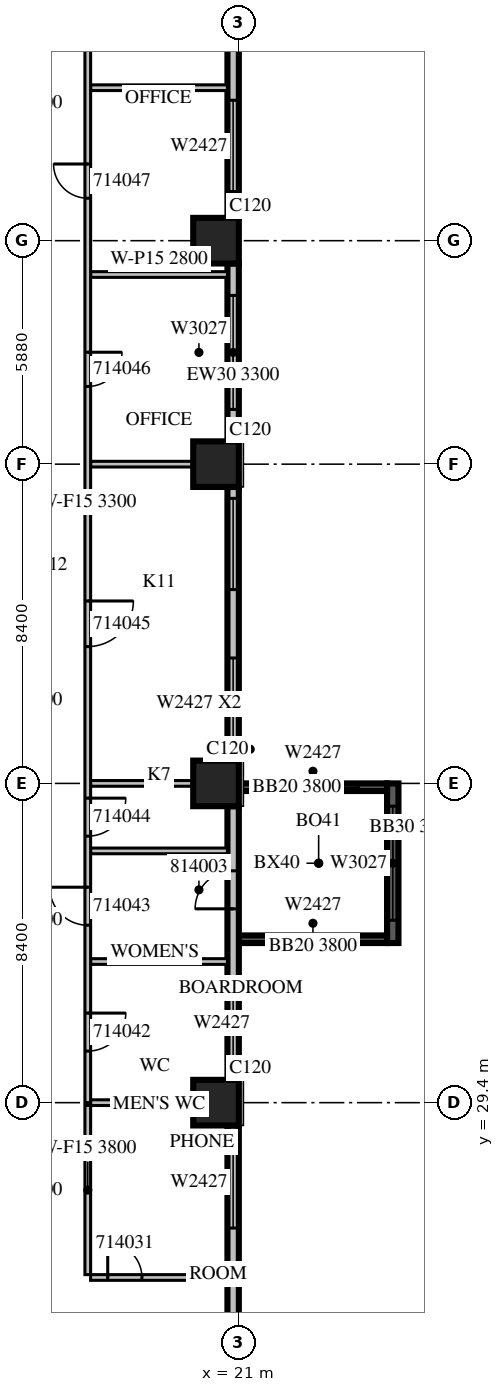
"""IFC4 building model, lengths in metres.
Left out: names, types, materials, properties, quantities, classifications, styles, units other than length and angle.
Written with IfcOpenShell. Run it as: python <this file> out.ifc"""

import sys

from ifc_helpers import new_model, si_unit, direction, frame, frame_2d, origin, origin_2d, place, context, subcontext, project, spatial, rectangle, extrude, source, transform, mapped, element, fill, save


model = new_model("IFC4")
c1 = context("Model", 3, precision=1e-05, world=origin(), true_north=direction((0.0, 1.0)))
c2 = subcontext(c1, "Body", "Model", "MODEL_VIEW")
j1 = project(units=[si_unit("LENGTHUNIT", "METRE"), si_unit("PLANEANGLEUNIT", "RADIAN")], contexts=[c1])
p1 = place(None, origin())
s1 = spatial("IfcSite", under=j1, at=p1, CompositionType="ELEMENT")
p2 = place(p1, origin())
s2 = spatial("IfcBuilding", under=s1, at=p2, CompositionType="ELEMENT")
p3 = place(p2, frame((0.0, 0.0, 69.9)))
s3 = spatial("IfcBuildingStorey", under=s2, at=p3, CompositionType="ELEMENT", Elevation=69.9)
m1 = source(origin(), c2, "Body", "SweptSolid", [
    extrude(rectangle(XDim=1.2, YDim=1.2, at=origin_2d()), origin(), (0.0, 0.0, 1.0), 4.2),
])
for number, where, z_axis, x_axis in (
    (1, (20.4, 29.4, 0.0), (0.0, 0.0, 1.0), (1.0, 0.0, 0.0)),
    (2, (20.4, 37.8, 0.0), (0.0, 0.0, 1.0), (1.0, 0.0, 0.0)),
    (3, (20.4, 46.2, 0.0), (0.0, 0.0, 1.0), (1.0, 0.0, 0.0)),
    (4, (20.4, 52.08, 0.0), (0.0, 0.0, 1.0), (1.0, 0.0, 0.0)),
):
    element("IfcColumn", number, at=place(p3, frame(where, z_axis=z_axis, x_axis=x_axis)), inside=s3, PredefinedType="COLUMN", context=c2, shape_type="MappedRepresentation", body=[
        mapped(m1, transform((0.0, 0.0, 0.0), scale=1.0)),
    ])
m2 = source(origin(), c2, "Body", "SweptSolid", [
    extrude(rectangle(XDim=4.2, YDim=0.3, at=frame_2d((2.1, 0.0))), origin(), (0.0, 0.0, 1.0), 3.8),
])
p4 = place(p3, frame((25.05, 33.6, 0.0), z_axis=(0.0, 0.0, 1.0), x_axis=(0.0, 1.0, 0.0)))
e5 = element("IfcWall", 5, at=p4, inside=s3, PredefinedType="SOLIDWALL", context=c2, shape_type="MappedRepresentation", body=[
    mapped(m2, transform((0.0, 0.0, 0.0), scale=1.0)),
])
m3 = source(origin(), c2, "Body", "SweptSolid", [
    extrude(rectangle(XDim=3.0, YDim=2.7, at=frame_2d((1.5, 1.35))), frame((0.0, 0.16, 0.0), z_axis=(0.0, -1.0, 0.0), x_axis=(1.0, 0.0, 0.0)), (0.0, 0.0, 1.0), 0.32),
])
p5 = place(p4, frame((0.6, 0.0, 0.6)))
e6 = element("IfcOpeningElement", 6, at=p5, cuts=e5, PredefinedType="OPENING", context=c2, shape_type="MappedRepresentation", body=[
    mapped(m3, transform((0.0, 0.0, 0.0), scale=1.0)),
])
m4 = source(origin(), c2, "Body", "SweptSolid", [
    extrude(rectangle(XDim=3.9, YDim=0.2, at=frame_2d((1.95, 0.0))), origin(), (0.0, 0.0, 1.0), 3.8),
])
p6 = place(p3, frame((21.0, 33.7, 0.0), z_axis=(0.0, 0.0, 1.0), x_axis=(1.0, 0.0, 0.0)))
e7 = element("IfcWall", 7, at=p6, inside=s3, PredefinedType="SOLIDWALL", context=c2, shape_type="MappedRepresentation", body=[
    mapped(m4, transform((0.0, 0.0, 0.0), scale=1.0)),
])
m5 = source(origin(), c2, "Body", "SweptSolid", [
    extrude(rectangle(XDim=2.4, YDim=2.7, at=frame_2d((1.2, 1.35))), frame((0.0, 0.11, 0.0), z_axis=(0.0, -1.0, 0.0), x_axis=(1.0, 0.0, 0.0)), (0.0, 0.0, 1.0), 0.22),
])
p7 = place(p6, frame((0.75, 0.0, 0.6)))
e8 = element("IfcOpeningElement", 8, at=p7, cuts=e7, PredefinedType="OPENING", context=c2, shape_type="MappedRepresentation", body=[
    mapped(m5, transform((0.0, 0.0, 0.0), scale=1.0)),
])
p8 = place(p3, frame((21.0, 37.7, 0.0), z_axis=(0.0, 0.0, 1.0), x_axis=(1.0, 0.0, 0.0)))
e9 = element("IfcWall", 9, at=p8, inside=s3, PredefinedType="SOLIDWALL", context=c2, shape_type="MappedRepresentation", body=[
    mapped(m4, transform((0.0, 0.0, 0.0), scale=1.0)),
])
p9 = place(p8, frame((0.75, 0.0, 0.6)))
e10 = element("IfcOpeningElement", 10, at=p9, cuts=e9, PredefinedType="OPENING", context=c2, shape_type="MappedRepresentation", body=[
    mapped(m5, transform((0.0, 0.0, 0.0), scale=1.0)),
])
m6 = source(origin(), c2, "Body", "SweptSolid", [
    extrude(rectangle(XDim=6.6, YDim=0.3, at=frame_2d((3.3, 0.0))), origin(), (0.0, 0.0, 1.0), 3.8),
])
p10 = place(p3, frame((20.85, 22.2, 0.0), z_axis=(0.0, 0.0, 1.0), x_axis=(0.0, 1.0, 0.0)))
e11 = element("IfcWall", 11, at=p10, inside=s3, PredefinedType="STANDARD", context=c2, shape_type="MappedRepresentation", body=[
    mapped(m6, transform((0.0, 0.0, 0.0), scale=1.0)),
])
m7 = source(origin(), c2, "Body", "SweptSolid", [
    extrude(rectangle(XDim=1.2, YDim=2.7, at=frame_2d((0.6, 1.35))), frame((0.0, 0.16, 0.0), z_axis=(0.0, -1.0, 0.0), x_axis=(1.0, 0.0, 0.0)), (0.0, 0.0, 1.0), 0.32),
])
p11 = place(p10, frame((0.3, 0.0, 0.6)))
e12 = element("IfcOpeningElement", 12, at=p11, cuts=e11, PredefinedType="OPENING", context=c2, shape_type="MappedRepresentation", body=[
    mapped(m7, transform((0.0, 0.0, 0.0), scale=1.0)),
])
m8 = source(origin(), c2, "Body", "SweptSolid", [
    extrude(rectangle(XDim=2.4, YDim=2.7, at=frame_2d((1.2, 1.35))), frame((0.0, 0.16, 0.0), z_axis=(0.0, -1.0, 0.0), x_axis=(1.0, 0.0, 0.0)), (0.0, 0.0, 1.0), 0.32),
])
p12 = place(p10, frame((3.9, 0.0, 0.6)))
e13 = element("IfcOpeningElement", 13, at=p12, cuts=e11, PredefinedType="OPENING", context=c2, shape_type="MappedRepresentation", body=[
    mapped(m8, transform((0.0, 0.0, 0.0), scale=1.0)),
])
m9 = source(origin(), c2, "Body", "SweptSolid", [
    extrude(rectangle(XDim=7.2, YDim=0.3, at=frame_2d((3.6, 0.0))), origin(), (0.0, 0.0, 1.0), 3.8),
])
p13 = place(p3, frame((20.85, 30.0, 0.0), z_axis=(0.0, 0.0, 1.0), x_axis=(0.0, 1.0, 0.0)))
e14 = element("IfcWall", 14, at=p13, inside=s3, PredefinedType="STANDARD", context=c2, shape_type="MappedRepresentation", body=[
    mapped(m9, transform((0.0, 0.0, 0.0), scale=1.0)),
])
p14 = place(p13, frame((0.3, 0.0, 0.6)))
e15 = element("IfcOpeningElement", 15, at=p14, cuts=e14, PredefinedType="OPENING", context=c2, shape_type="MappedRepresentation", body=[
    mapped(m8, transform((0.0, 0.0, 0.0), scale=1.0)),
])
m10 = source(origin(), c2, "Body", "SweptSolid", [
    extrude(rectangle(XDim=1.0, YDim=2.1, at=frame_2d((0.5, 1.05))), frame((0.0, 0.16, 0.0), z_axis=(0.0, -1.0, 0.0), x_axis=(1.0, 0.0, 0.0)), (0.0, 0.0, 1.0), 0.32),
])
p15 = place(p13, frame((4.5, 0.0, 0.0)))
e16 = element("IfcOpeningElement", 16, at=p15, cuts=e14, PredefinedType="OPENING", context=c2, shape_type="MappedRepresentation", body=[
    mapped(m10, transform((0.0, 0.0, 0.0), scale=1.0)),
])
p16 = place(p3, frame((20.85, 38.4, 0.0), z_axis=(0.0, 0.0, 1.0), x_axis=(0.0, 1.0, 0.0)))
e17 = element("IfcWall", 17, at=p16, inside=s3, PredefinedType="STANDARD", context=c2, shape_type="MappedRepresentation", body=[
    mapped(m9, transform((0.0, 0.0, 0.0), scale=1.0)),
])
p17 = place(p16, frame((0.3, 0.0, 0.6)))
e18 = element("IfcOpeningElement", 18, at=p17, cuts=e17, PredefinedType="OPENING", context=c2, shape_type="MappedRepresentation", body=[
    mapped(m8, transform((0.0, 0.0, 0.0), scale=1.0)),
])
p18 = place(p16, frame((4.5, 0.0, 0.6)))
e19 = element("IfcOpeningElement", 19, at=p18, cuts=e17, PredefinedType="OPENING", context=c2, shape_type="MappedRepresentation", body=[
    mapped(m8, transform((0.0, 0.0, 0.0), scale=1.0)),
])
m11 = source(origin(), c2, "Body", "SweptSolid", [
    extrude(rectangle(XDim=4.68, YDim=0.3, at=frame_2d((2.34, 0.0))), origin(), (0.0, 0.0, 1.0), 3.3),
])
p19 = place(p3, frame((20.85, 46.8, 0.0), z_axis=(0.0, 0.0, 1.0), x_axis=(0.0, 1.0, 0.0)))
e20 = element("IfcWall", 20, at=p19, inside=s3, PredefinedType="STANDARD", context=c2, shape_type="MappedRepresentation", body=[
    mapped(m11, transform((0.0, 0.0, 0.0), scale=1.0)),
])
p20 = place(p19, frame((0.84, 0.0, 0.6)))
e21 = element("IfcOpeningElement", 21, at=p20, cuts=e20, PredefinedType="OPENING", context=c2, shape_type="MappedRepresentation", body=[
    mapped(m3, transform((0.0, 0.0, 0.0), scale=1.0)),
])
m12 = source(origin(), c2, "Body", "SweptSolid", [
    extrude(rectangle(XDim=4.68, YDim=0.3, at=frame_2d((2.34, 0.0))), origin(), (0.0, 0.0, 1.0), 3.8),
])
p21 = place(p3, frame((20.85, 52.68, 0.0), z_axis=(0.0, 0.0, 1.0), x_axis=(0.0, 1.0, 0.0)))
e22 = element("IfcWall", 22, at=p21, inside=s3, PredefinedType="STANDARD", context=c2, shape_type="MappedRepresentation", body=[
    mapped(m12, transform((0.0, 0.0, 0.0), scale=1.0)),
])
p22 = place(p21, frame((0.695, 0.0, 0.6)))
e23 = element("IfcOpeningElement", 23, at=p22, cuts=e22, PredefinedType="OPENING", context=c2, shape_type="MappedRepresentation", body=[
    mapped(m8, transform((0.0, 0.0, 0.0), scale=1.0)),
])
m13 = source(origin(), c2, "Body", "SweptSolid", [
    extrude(rectangle(XDim=3.6, YDim=0.15, at=frame_2d((1.8, 0.0))), origin(), (0.0, 0.0, 1.0), 3.8),
])
p23 = place(p3, frame((17.1, 24.8, 0.0), z_axis=(0.0, 0.0, 1.0), x_axis=(1.0, 0.0, 0.0)))
e24 = element("IfcWall", 24, at=p23, inside=s3, PredefinedType="PARTITIONING", context=c2, shape_type="MappedRepresentation", body=[
    mapped(m13, transform((0.0, 0.0, 0.0), scale=1.0)),
])
m14 = source(origin(), c2, "Body", "SweptSolid", [
    extrude(rectangle(XDim=0.9, YDim=2.1, at=frame_2d((0.45, 1.05))), frame((0.0, 0.085, 0.0), z_axis=(0.0, -1.0, 0.0), x_axis=(1.0, 0.0, 0.0)), (0.0, 0.0, 1.0), 0.17),
])
p24 = place(p23, frame((0.45, 0.0, 0.0)))
e25 = element("IfcOpeningElement", 25, at=p24, cuts=e24, PredefinedType="OPENING", context=c2, shape_type="MappedRepresentation", body=[
    mapped(m14, transform((0.0, 0.0, 0.0), scale=1.0)),
])
m15 = source(origin(), c2, "Body", "SweptSolid", [
    extrude(rectangle(XDim=4.45, YDim=0.15, at=frame_2d((2.225, 0.0))), origin(), (0.0, 0.0, 1.0), 3.8),
])
p25 = place(p3, frame((17.025, 29.325, 0.0), z_axis=(0.0, 0.0, 1.0), x_axis=(0.0, -1.0, 0.0)))
e26 = element("IfcWall", 26, at=p25, inside=s3, PredefinedType="PARTITIONING", context=c2, shape_type="MappedRepresentation", body=[
    mapped(m15, transform((0.0, 0.0, 0.0), scale=1.0)),
])
m16 = source(origin(), c2, "Body", "SweptSolid", [
    extrude(rectangle(XDim=2.701, YDim=0.15, at=frame_2d((1.351, 0.0))), origin(), (0.0, 0.0, 1.0), 3.8),
])
p26 = place(p3, frame((19.801, 29.4, 0.0), z_axis=(0.0, 0.0, 1.0), x_axis=(-1.0, 0.0, 0.0)))
e27 = element("IfcWall", 27, at=p26, inside=s3, PredefinedType="PARTITIONING", context=c2, shape_type="MappedRepresentation", body=[
    mapped(m16, transform((0.0, 0.0, 0.0), scale=1.0)),
])
for number, where, z_axis, x_axis in (
    (28, (17.1, 33.113, 0.0), (0.0, 0.0, 1.0), (1.0, 0.0, 0.0)),
    (29, (17.1, 36.024, 0.0), (0.0, 0.0, 1.0), (1.0, 0.0, 0.0)),
):
    element("IfcWall", number, at=place(p3, frame(where, z_axis=z_axis, x_axis=x_axis)), inside=s3, PredefinedType="PARTITIONING", context=c2, shape_type="MappedRepresentation", body=[
        mapped(m13, transform((0.0, 0.0, 0.0), scale=1.0)),
    ])
m17 = source(origin(), c2, "Body", "SweptSolid", [
    extrude(rectangle(XDim=3.6, YDim=0.15, at=frame_2d((1.8, 0.0))), origin(), (0.0, 0.0, 1.0), 2.8),
])
p27 = place(p3, frame((17.1, 51.19, 0.0), z_axis=(0.0, 0.0, 1.0), x_axis=(1.0, 0.0, 0.0)))
e30 = element("IfcWall", 30, at=p27, inside=s3, PredefinedType="PARTITIONING", context=c2, shape_type="MappedRepresentation", body=[
    mapped(m17, transform((0.0, 0.0, 0.0), scale=1.0)),
])
p28 = place(p3, frame((17.1, 56.105, 0.0), z_axis=(0.0, 0.0, 1.0), x_axis=(1.0, 0.0, 0.0)))
e31 = element("IfcWall", 31, at=p28, inside=s3, PredefinedType="PARTITIONING", context=c2, shape_type="MappedRepresentation", body=[
    mapped(m13, transform((0.0, 0.0, 0.0), scale=1.0)),
])
for number, where, z_axis, x_axis in (
    (32, (19.801, 37.8, 0.0), (0.0, 0.0, 1.0), (-1.0, 0.0, 0.0)),
    (33, (19.801, 46.2, 0.0), (0.0, 0.0, 1.0), (-1.0, 0.0, 0.0)),
):
    element("IfcWall", number, at=place(p3, frame(where, z_axis=z_axis, x_axis=x_axis)), inside=s3, PredefinedType="PARTITIONING", context=c2, shape_type="MappedRepresentation", body=[
        mapped(m16, transform((0.0, 0.0, 0.0), scale=1.0)),
    ])
m18 = source(origin(), c2, "Body", "SweptSolid", [
    extrude(rectangle(XDim=31.62, YDim=0.15, at=frame_2d((15.81, 0.0))), origin(), (0.0, 0.0, 1.0), 3.3),
])
p29 = place(p3, frame((17.025, 61.02, 0.0), z_axis=(0.0, 0.0, 1.0), x_axis=(0.0, -1.0, 0.0)))
e34 = element("IfcWall", 34, at=p29, inside=s3, PredefinedType="PARTITIONING", context=c2, shape_type="MappedRepresentation", body=[
    mapped(m18, transform((0.0, 0.0, 0.0), scale=1.0)),
])
m19 = source(origin(), c2, "Body", "SweptSolid", [
    extrude(rectangle(XDim=1.0, YDim=2.1, at=frame_2d((0.5, 1.05))), frame((0.0, 0.085, 0.0), z_axis=(0.0, -1.0, 0.0), x_axis=(1.0, 0.0, 0.0)), (0.0, 0.0, 1.0), 0.17),
])
p30 = place(p29, frame((29.263, 0.0, 0.0)))
e35 = element("IfcOpeningElement", 35, at=p30, cuts=e34, PredefinedType="OPENING", context=c2, shape_type="MappedRepresentation", body=[
    mapped(m19, transform((0.0, 0.0, 0.0), scale=1.0)),
])
p31 = place(p29, frame((25.951, 0.0, 0.0)))
e36 = element("IfcOpeningElement", 36, at=p31, cuts=e34, PredefinedType="OPENING", context=c2, shape_type="MappedRepresentation", body=[
    mapped(m19, transform((0.0, 0.0, 0.0), scale=1.0)),
])
p32 = place(p29, frame((23.608, 0.0, 0.0)))
e37 = element("IfcOpeningElement", 37, at=p32, cuts=e34, PredefinedType="OPENING", context=c2, shape_type="MappedRepresentation", body=[
    mapped(m19, transform((0.0, 0.0, 0.0), scale=1.0)),
])
m20 = source(origin(), c2, "Body", "SweptSolid", [
    extrude(rectangle(XDim=1.2, YDim=2.1, at=frame_2d((0.6, 1.05))), frame((0.0, 0.085, 0.0), z_axis=(0.0, -1.0, 0.0), x_axis=(1.0, 0.0, 0.0)), (0.0, 0.0, 1.0), 0.17),
])
p33 = place(p29, frame((18.42, 0.0, 0.0)))
e38 = element("IfcOpeningElement", 38, at=p33, cuts=e34, PredefinedType="OPENING", context=c2, shape_type="MappedRepresentation", body=[
    mapped(m20, transform((0.0, 0.0, 0.0), scale=1.0)),
])
p34 = place(p29, frame((11.875, 0.0, 0.0)))
e39 = element("IfcOpeningElement", 39, at=p34, cuts=e34, PredefinedType="OPENING", context=c2, shape_type="MappedRepresentation", body=[
    mapped(m14, transform((0.0, 0.0, 0.0), scale=1.0)),
])
p35 = place(p29, frame((6.923, 0.0, 0.0)))
e40 = element("IfcOpeningElement", 40, at=p35, cuts=e34, PredefinedType="OPENING", context=c2, shape_type="MappedRepresentation", body=[
    mapped(m14, transform((0.0, 0.0, 0.0), scale=1.0)),
])
p36 = place(p29, frame((1.97, 0.0, 0.0)))
e41 = element("IfcOpeningElement", 41, at=p36, cuts=e34, PredefinedType="OPENING", context=c2, shape_type="MappedRepresentation", body=[
    mapped(m14, transform((0.0, 0.0, 0.0), scale=1.0)),
])
m21 = source(origin(), c2, "Body", "SweptSolid", [
    extrude(rectangle(XDim=3.0, YDim=2.7, at=frame_2d((1.5, 1.35))), frame((0.0, 0.03, 0.0), z_axis=(0.0, -1.0, 0.0), x_axis=(1.0, 0.0, 0.0)), (0.0, 0.0, 1.0), 0.06),
])
p37 = place(p5, origin())
e42 = element("IfcWindow", 42, at=p37, inside=s3, PartitioningType="SINGLE_PANEL", PredefinedType="WINDOW", context=c2, shape_type="MappedRepresentation", body=[
    mapped(m21, transform((0.0, 0.0, 0.0), scale=1.0)),
])
fill(e6, e42)
m22 = source(origin(), c2, "Body", "SweptSolid", [
    extrude(rectangle(XDim=2.4, YDim=2.7, at=frame_2d((1.2, 1.35))), frame((0.0, 0.03, 0.0), z_axis=(0.0, -1.0, 0.0), x_axis=(1.0, 0.0, 0.0)), (0.0, 0.0, 1.0), 0.06),
])
p38 = place(p7, origin())
e43 = element("IfcWindow", 43, at=p38, inside=s3, PartitioningType="SINGLE_PANEL", PredefinedType="WINDOW", context=c2, shape_type="MappedRepresentation", body=[
    mapped(m22, transform((0.0, 0.0, 0.0), scale=1.0)),
])
fill(e8, e43)
p39 = place(p9, origin())
e44 = element("IfcWindow", 44, at=p39, inside=s3, PartitioningType="SINGLE_PANEL", PredefinedType="WINDOW", context=c2, shape_type="MappedRepresentation", body=[
    mapped(m22, transform((0.0, 0.0, 0.0), scale=1.0)),
])
fill(e10, e44)
p40 = place(p12, origin())
e45 = element("IfcWindow", 45, at=p40, inside=s3, PartitioningType="SINGLE_PANEL", PredefinedType="WINDOW", context=c2, shape_type="MappedRepresentation", body=[
    mapped(m22, transform((0.0, 0.0, 0.0), scale=1.0)),
])
fill(e13, e45)
p41 = place(p14, origin())
e46 = element("IfcWindow", 46, at=p41, inside=s3, PartitioningType="SINGLE_PANEL", PredefinedType="WINDOW", context=c2, shape_type="MappedRepresentation", body=[
    mapped(m22, transform((0.0, 0.0, 0.0), scale=1.0)),
])
fill(e15, e46)
p42 = place(p17, origin())
e47 = element("IfcWindow", 47, at=p42, inside=s3, PartitioningType="SINGLE_PANEL", PredefinedType="WINDOW", context=c2, shape_type="MappedRepresentation", body=[
    mapped(m22, transform((0.0, 0.0, 0.0), scale=1.0)),
])
fill(e18, e47)
p43 = place(p18, origin())
e48 = element("IfcWindow", 48, at=p43, inside=s3, PartitioningType="SINGLE_PANEL", PredefinedType="WINDOW", context=c2, shape_type="MappedRepresentation", body=[
    mapped(m22, transform((0.0, 0.0, 0.0), scale=1.0)),
])
fill(e19, e48)
p44 = place(p20, origin())
e49 = element("IfcWindow", 49, at=p44, inside=s3, PartitioningType="SINGLE_PANEL", PredefinedType="WINDOW", context=c2, shape_type="MappedRepresentation", body=[
    mapped(m21, transform((0.0, 0.0, 0.0), scale=1.0)),
])
fill(e21, e49)
p45 = place(p22, origin())
e50 = element("IfcWindow", 50, at=p45, inside=s3, PartitioningType="SINGLE_PANEL", PredefinedType="WINDOW", context=c2, shape_type="MappedRepresentation", body=[
    mapped(m22, transform((0.0, 0.0, 0.0), scale=1.0)),
])
fill(e23, e50)
m23 = source(origin(), c2, "Body", "SweptSolid", [
    extrude(rectangle(XDim=0.9, YDim=2.1, at=frame_2d((0.45, 1.05))), frame((0.0, 0.025, 0.0), z_axis=(0.0, -1.0, 0.0), x_axis=(1.0, 0.0, 0.0)), (0.0, 0.0, 1.0), 0.05),
])
p46 = place(p24, origin())
e51 = element("IfcDoor", 51, at=p46, inside=s3, OperationType="SINGLE_SWING_LEFT", PredefinedType="DOOR", context=c2, shape_type="MappedRepresentation", body=[
    mapped(m23, transform((0.0, 0.0, 0.0), scale=1.0)),
])
fill(e25, e51)
m24 = source(origin(), c2, "Body", "SweptSolid", [
    extrude(rectangle(XDim=1.0, YDim=2.1, at=frame_2d((0.5, 1.05))), frame((0.0, 0.025, 0.0), z_axis=(0.0, -1.0, 0.0), x_axis=(1.0, 0.0, 0.0)), (0.0, 0.0, 1.0), 0.05),
])
p47 = place(p30, origin())
e52 = element("IfcDoor", 52, at=p47, inside=s3, OperationType="SINGLE_SWING_LEFT", PredefinedType="DOOR", context=c2, shape_type="MappedRepresentation", body=[
    mapped(m24, transform((0.0, 0.0, 0.0), scale=1.0)),
])
fill(e35, e52)
p48 = place(p31, origin())
e53 = element("IfcDoor", 53, at=p48, inside=s3, OperationType="SINGLE_SWING_RIGHT", PredefinedType="DOOR", context=c2, shape_type="MappedRepresentation", body=[
    mapped(m24, transform((0.0, 0.0, 0.0), scale=1.0)),
])
fill(e36, e53)
p49 = place(p32, origin())
e54 = element("IfcDoor", 54, at=p49, inside=s3, OperationType="SINGLE_SWING_LEFT", PredefinedType="DOOR", context=c2, shape_type="MappedRepresentation", body=[
    mapped(m24, transform((0.0, 0.0, 0.0), scale=1.0)),
])
fill(e37, e54)
m25 = source(origin(), c2, "Body", "SweptSolid", [
    extrude(rectangle(XDim=1.2, YDim=2.1, at=frame_2d((0.6, 1.05))), frame((0.0, 0.025, 0.0), z_axis=(0.0, -1.0, 0.0), x_axis=(1.0, 0.0, 0.0)), (0.0, 0.0, 1.0), 0.05),
])
p50 = place(p33, origin())
e55 = element("IfcDoor", 55, at=p50, inside=s3, OperationType="SINGLE_SWING_LEFT", PredefinedType="DOOR", context=c2, shape_type="MappedRepresentation", body=[
    mapped(m25, transform((0.0, 0.0, 0.0), scale=1.0)),
])
fill(e38, e55)
p51 = place(p34, origin())
e56 = element("IfcDoor", 56, at=p51, inside=s3, OperationType="SINGLE_SWING_LEFT", PredefinedType="DOOR", context=c2, shape_type="MappedRepresentation", body=[
    mapped(m23, transform((0.0, 0.0, 0.0), scale=1.0)),
])
fill(e39, e56)
p52 = place(p35, origin())
e57 = element("IfcDoor", 57, at=p52, inside=s3, OperationType="SINGLE_SWING_RIGHT", PredefinedType="DOOR", context=c2, shape_type="MappedRepresentation", body=[
    mapped(m23, transform((0.0, 0.0, 0.0), scale=1.0)),
])
fill(e40, e57)
p53 = place(p15, origin())
e58 = element("IfcDoor", 58, at=p53, inside=s3, OperationType="SINGLE_SWING_LEFT", PredefinedType="DOOR", context=c2, shape_type="MappedRepresentation", body=[
    mapped(m24, transform((0.0, 0.0, 0.0), scale=1.0)),
])
fill(e16, e58)
save(model, sys.argv[1])
